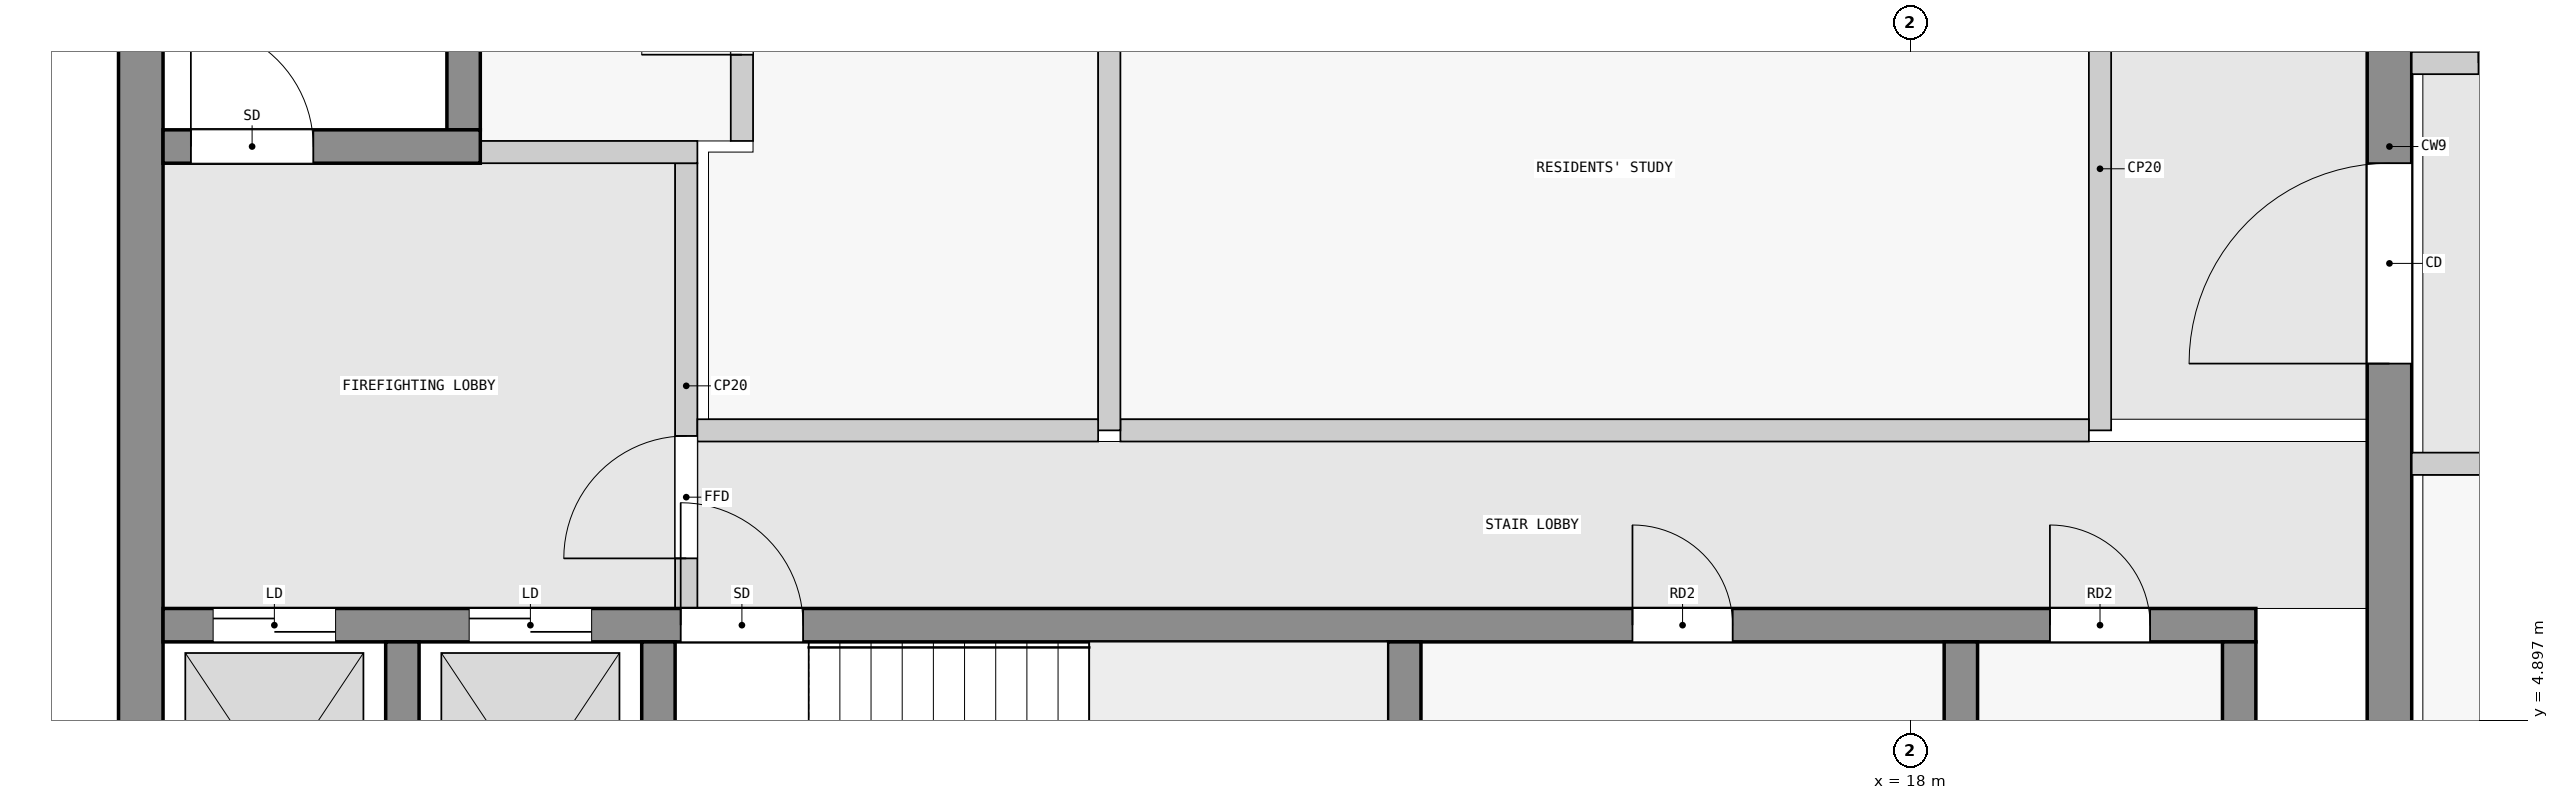
"""IFC4 building model, lengths in metres.
Left out: names, types, materials, properties, quantities, classifications, styles, units other than length and angle.
Written with IfcOpenShell. Run it as: python <this file> out.ifc"""

import sys

from ifc_helpers import new_model, si_unit, direction, frame, frame_2d, origin, place, context, subcontext, project, spatial, rectangle, extrude, element, fill, save


model = new_model("IFC4")
c1 = context("Model", 3, precision=1e-05, world=origin(), true_north=direction((0.0, 1.0)))
c2 = subcontext(c1, "Body", "Model", "MODEL_VIEW")
j1 = project(units=[si_unit("LENGTHUNIT", "METRE"), si_unit("PLANEANGLEUNIT", "RADIAN")], contexts=[c1])
p1 = place(None, origin())
s1 = spatial("IfcSite", under=j1, at=p1, CompositionType="ELEMENT")
p2 = place(p1, origin())
s2 = spatial("IfcBuilding", under=s1, at=p2, CompositionType="ELEMENT")
p3 = place(p2, frame((0.0, 0.0, 305.4)))
s3 = spatial("IfcBuildingStorey", under=s2, at=p3, CompositionType="ELEMENT", Elevation=305.4)
p4 = place(p3, frame((2.1, 2.5, 0.0), z_axis=(0.0, 0.0, 1.0), x_axis=(0.0, 1.0, 0.0)))
e1 = element("IfcWall", 1, at=p4, inside=s3, PredefinedType="SHEAR", context=c2, shape_type="SweptSolid", body=[
    extrude(rectangle(XDim=15.1, YDim=0.4, at=frame_2d((7.55, 0.0))), origin(), (0.0, 0.0, 1.0), 3.25),
])
p5 = place(p3, frame((22.3, 2.5, 0.0), z_axis=(0.0, 0.0, 1.0), x_axis=(0.0, 1.0, 0.0)))
e2 = element("IfcWall", 2, at=p5, inside=s3, PredefinedType="SHEAR", context=c2, shape_type="SweptSolid", body=[
    extrude(rectangle(XDim=15.1, YDim=0.4, at=frame_2d((7.55, 0.0))), origin(), (0.0, 0.0, 1.0), 3.25),
])
p6 = place(p5, frame((5.6, 0.0, 0.0)))
e3 = element("IfcOpeningElement", 3, at=p6, cuts=e2, PredefinedType="OPENING", context=c2, shape_type="SweptSolid", body=[
    extrude(rectangle(XDim=1.8, YDim=2.1, at=frame_2d((0.9, 1.05))), frame((0.0, 0.21, 0.0), z_axis=(0.0, -1.0, 0.0), x_axis=(1.0, 0.0, 0.0)), (0.0, 0.0, 1.0), 0.42),
])
for number, where, z_axis, x_axis in (
    (4, (4.45, 2.8, 0.0), (0.0, 0.0, 1.0), (0.0, 1.0, 0.0)),
    (5, (6.75, 2.8, 0.0), (0.0, 0.0, 1.0), (0.0, 1.0, 0.0)),
    (6, (13.45, 2.8, 0.0), (0.0, 0.0, 1.0), (0.0, 1.0, 0.0)),
    (7, (18.45, 2.8, 0.0), (0.0, 0.0, 1.0), (0.0, 1.0, 0.0)),
    (8, (20.95, 2.8, 0.0), (0.0, 0.0, 1.0), (0.0, 1.0, 0.0)),
):
    element("IfcWall", number, at=place(p3, frame(where, z_axis=z_axis, x_axis=x_axis)), inside=s3, PredefinedType="SHEAR", context=c2, shape_type="SweptSolid", body=[
        extrude(rectangle(XDim=2.8, YDim=0.3, at=frame_2d((1.4, 0.0))), origin(), (0.0, 0.0, 1.0), 3.25),
    ])
p7 = place(p3, frame((2.3, 5.75, 0.0), z_axis=(0.0, 0.0, 1.0), x_axis=(1.0, 0.0, 0.0)))
e9 = element("IfcWall", 9, at=p7, inside=s3, PredefinedType="SHEAR", context=c2, shape_type="SweptSolid", body=[
    extrude(rectangle(XDim=18.8, YDim=0.3, at=frame_2d((9.4, 0.0))), origin(), (0.0, 0.0, 1.0), 3.25),
])
p8 = place(p7, frame((4.65, 0.0, 0.0)))
e10 = element("IfcOpeningElement", 10, at=p8, cuts=e9, PredefinedType="OPENING", context=c2, shape_type="SweptSolid", body=[
    extrude(rectangle(XDim=1.1, YDim=2.1, at=frame_2d((0.55, 1.05))), frame((0.0, 0.16, 0.0), z_axis=(0.0, -1.0, 0.0), x_axis=(1.0, 0.0, 0.0)), (0.0, 0.0, 1.0), 0.32),
])
p9 = place(p7, frame((0.45, 0.0, 0.0)))
e11 = element("IfcOpeningElement", 11, at=p9, cuts=e9, PredefinedType="OPENING", context=c2, shape_type="SweptSolid", body=[
    extrude(rectangle(XDim=1.1, YDim=2.1, at=frame_2d((0.55, 1.05))), frame((0.0, 0.16, 0.0), z_axis=(0.0, -1.0, 0.0), x_axis=(1.0, 0.0, 0.0)), (0.0, 0.0, 1.0), 0.32),
])
p10 = place(p7, frame((2.75, 0.0, 0.0)))
e12 = element("IfcOpeningElement", 12, at=p10, cuts=e9, PredefinedType="OPENING", context=c2, shape_type="SweptSolid", body=[
    extrude(rectangle(XDim=1.1, YDim=2.1, at=frame_2d((0.55, 1.05))), frame((0.0, 0.16, 0.0), z_axis=(0.0, -1.0, 0.0), x_axis=(1.0, 0.0, 0.0)), (0.0, 0.0, 1.0), 0.32),
])
p11 = place(p7, frame((13.2, 0.0, 0.0)))
e13 = element("IfcOpeningElement", 13, at=p11, cuts=e9, PredefinedType="OPENING", context=c2, shape_type="SweptSolid", body=[
    extrude(rectangle(XDim=0.9, YDim=2.1, at=frame_2d((0.45, 1.05))), frame((0.0, 0.16, 0.0), z_axis=(0.0, -1.0, 0.0), x_axis=(1.0, 0.0, 0.0)), (0.0, 0.0, 1.0), 0.32),
])
p12 = place(p7, frame((16.95, 0.0, 0.0)))
e14 = element("IfcOpeningElement", 14, at=p12, cuts=e9, PredefinedType="OPENING", context=c2, shape_type="SweptSolid", body=[
    extrude(rectangle(XDim=0.9, YDim=2.1, at=frame_2d((0.45, 1.05))), frame((0.0, 0.16, 0.0), z_axis=(0.0, -1.0, 0.0), x_axis=(1.0, 0.0, 0.0)), (0.0, 0.0, 1.0), 0.32),
])
p13 = place(p3, frame((2.3, 10.05, 0.0), z_axis=(0.0, 0.0, 1.0), x_axis=(1.0, 0.0, 0.0)))
e15 = element("IfcWall", 15, at=p13, inside=s3, PredefinedType="SHEAR", context=c2, shape_type="SweptSolid", body=[
    extrude(rectangle(XDim=2.85, YDim=0.3, at=frame_2d((1.425, 0.0))), origin(), (0.0, 0.0, 1.0), 3.25),
])
p14 = place(p13, frame((0.25, 0.0, 0.0)))
e16 = element("IfcOpeningElement", 16, at=p14, cuts=e15, PredefinedType="OPENING", context=c2, shape_type="SweptSolid", body=[
    extrude(rectangle(XDim=1.1, YDim=2.1, at=frame_2d((0.55, 1.05))), frame((0.0, 0.16, 0.0), z_axis=(0.0, -1.0, 0.0), x_axis=(1.0, 0.0, 0.0)), (0.0, 0.0, 1.0), 0.32),
])
p15 = place(p3, frame((5.0, 10.2, 0.0), z_axis=(0.0, 0.0, 1.0), x_axis=(0.0, 1.0, 0.0)))
e17 = element("IfcWall", 17, at=p15, inside=s3, PredefinedType="SHEAR", context=c2, shape_type="SweptSolid", body=[
    extrude(rectangle(XDim=6.4, YDim=0.3, at=frame_2d((3.2, 0.0))), origin(), (0.0, 0.0, 1.0), 3.25),
])
p16 = place(p3, frame((7.0, 5.9, 0.0), z_axis=(0.0, 0.0, 1.0), x_axis=(0.0, 1.0, 0.0)))
e18 = element("IfcWall", 18, at=p16, inside=s3, PredefinedType="PARTITIONING", context=c2, shape_type="SweptSolid", body=[
    extrude(rectangle(XDim=4.0, YDim=0.2, at=frame_2d((2.0, 0.0))), origin(), (0.0, 0.0, 1.0), 3.25),
])
p17 = place(p16, frame((0.45, 0.0, 0.0)))
e19 = element("IfcOpeningElement", 19, at=p17, cuts=e18, PredefinedType="OPENING", context=c2, shape_type="SweptSolid", body=[
    extrude(rectangle(XDim=1.1, YDim=2.1, at=frame_2d((0.55, 1.05))), frame((0.0, 0.11, 0.0), z_axis=(0.0, -1.0, 0.0), x_axis=(1.0, 0.0, 0.0)), (0.0, 0.0, 1.0), 0.22),
])
p18 = place(p3, frame((5.15, 10.0, 0.0), z_axis=(0.0, 0.0, 1.0), x_axis=(1.0, 0.0, 0.0)))
e20 = element("IfcWall", 20, at=p18, inside=s3, PredefinedType="PARTITIONING", context=c2, shape_type="SweptSolid", body=[
    extrude(rectangle(XDim=1.95, YDim=0.2, at=frame_2d((0.975, 0.0))), origin(), (0.0, 0.0, 1.0), 3.25),
])
p19 = place(p3, frame((7.1, 7.5, 0.0), z_axis=(0.0, 0.0, 1.0), x_axis=(1.0, 0.0, 0.0)))
e21 = element("IfcWall", 21, at=p19, inside=s3, PredefinedType="PARTITIONING", context=c2, shape_type="SweptSolid", body=[
    extrude(rectangle(XDim=3.6, YDim=0.2, at=frame_2d((1.8, 0.0))), origin(), (0.0, 0.0, 1.0), 3.25),
])
p20 = place(p3, frame((10.8, 7.5, 0.0), z_axis=(0.0, 0.0, 1.0), x_axis=(0.0, 1.0, 0.0)))
e22 = element("IfcWall", 22, at=p20, inside=s3, PredefinedType="PARTITIONING", context=c2, shape_type="SweptSolid", body=[
    extrude(rectangle(XDim=4.7, YDim=0.2, at=frame_2d((2.35, 0.0))), origin(), (0.0, 0.0, 1.0), 3.25),
])
p21 = place(p3, frame((10.9, 7.5, 0.0), z_axis=(0.0, 0.0, 1.0), x_axis=(1.0, 0.0, 0.0)))
e23 = element("IfcWall", 23, at=p21, inside=s3, PredefinedType="PARTITIONING", context=c2, shape_type="SweptSolid", body=[
    extrude(rectangle(XDim=8.7, YDim=0.2, at=frame_2d((4.35, 0.0))), origin(), (0.0, 0.0, 1.0), 3.25),
])
p22 = place(p3, frame((19.7, 7.5, 0.0), z_axis=(0.0, 0.0, 1.0), x_axis=(0.0, 1.0, 0.0)))
e24 = element("IfcWall", 24, at=p22, inside=s3, PredefinedType="PARTITIONING", context=c2, shape_type="SweptSolid", body=[
    extrude(rectangle(XDim=4.7, YDim=0.2, at=frame_2d((2.35, 0.0))), origin(), (0.0, 0.0, 1.0), 3.25),
])
p23 = place(p3, frame((7.5, 10.1, 0.0), z_axis=(0.0, 0.0, 1.0), x_axis=(0.0, 1.0, 0.0)))
e25 = element("IfcWall", 25, at=p23, inside=s3, PredefinedType="PARTITIONING", context=c2, shape_type="SweptSolid", body=[
    extrude(rectangle(XDim=7.5, YDim=0.2, at=frame_2d((3.75, 0.0))), origin(), (0.0, 0.0, 1.0), 3.25),
])
p24 = place(p23, frame((0.775, 0.0, 0.0)))
e26 = element("IfcOpeningElement", 26, at=p24, cuts=e25, PredefinedType="OPENING", context=c2, shape_type="SweptSolid", body=[
    extrude(rectangle(XDim=0.9, YDim=2.1, at=frame_2d((0.45, 1.05))), frame((0.0, 0.11, 0.0), z_axis=(0.0, -1.0, 0.0), x_axis=(1.0, 0.0, 0.0)), (0.0, 0.0, 1.0), 0.22),
])
p25 = place(p23, frame((3.225, 0.0, 0.0)))
e27 = element("IfcOpeningElement", 27, at=p25, cuts=e25, PredefinedType="OPENING", context=c2, shape_type="SweptSolid", body=[
    extrude(rectangle(XDim=0.9, YDim=2.1, at=frame_2d((0.45, 1.05))), frame((0.0, 0.11, 0.0), z_axis=(0.0, -1.0, 0.0), x_axis=(1.0, 0.0, 0.0)), (0.0, 0.0, 1.0), 0.22),
])
p26 = place(p23, frame((5.25, 0.0, 0.0)))
e28 = element("IfcOpeningElement", 28, at=p26, cuts=e25, PredefinedType="OPENING", context=c2, shape_type="SweptSolid", body=[
    extrude(rectangle(XDim=0.9, YDim=2.1, at=frame_2d((0.45, 1.05))), frame((0.0, 0.11, 0.0), z_axis=(0.0, -1.0, 0.0), x_axis=(1.0, 0.0, 0.0)), (0.0, 0.0, 1.0), 0.22),
])
p27 = place(p3, frame((27.0, 7.2, 0.0), z_axis=(0.0, 0.0, 1.0), x_axis=(-1.0, 0.0, 0.0)))
e29 = element("IfcWall", 29, at=p27, inside=s3, PredefinedType="PARTITIONING", context=c2, shape_type="SweptSolid", body=[
    extrude(rectangle(XDim=4.5, YDim=0.2, at=frame_2d((2.25, 0.0))), origin(), (0.0, 0.0, 1.0), 2.642),
])
p28 = place(p27, frame((1.35, 0.0, 0.0)))
e30 = element("IfcOpeningElement", 30, at=p28, cuts=e29, PredefinedType="OPENING", context=c2, shape_type="SweptSolid", body=[
    extrude(rectangle(XDim=1.8, YDim=2.1, at=frame_2d((0.9, 1.05))), frame((0.0, 0.11, 0.0), z_axis=(0.0, -1.0, 0.0), x_axis=(1.0, 0.0, 0.0)), (0.0, 0.0, 1.0), 0.22),
])
p29 = place(p3, frame((22.5, 10.8, 0.0), z_axis=(0.0, 0.0, 1.0), x_axis=(1.0, 0.0, 0.0)))
e31 = element("IfcWall", 31, at=p29, inside=s3, PredefinedType="PARTITIONING", context=c2, shape_type="SweptSolid", body=[
    extrude(rectangle(XDim=2.25, YDim=0.2, at=frame_2d((1.125, 0.0))), origin(), (0.0, 0.0, 1.0), 3.25),
])
p30 = place(p29, frame((0.6, 0.0, 0.0)))
e32 = element("IfcOpeningElement", 32, at=p30, cuts=e31, PredefinedType="OPENING", context=c2, shape_type="SweptSolid", body=[
    extrude(rectangle(XDim=0.9, YDim=2.1, at=frame_2d((0.45, 1.05))), frame((0.0, 0.11, 0.0), z_axis=(0.0, -1.0, 0.0), x_axis=(1.0, 0.0, 0.0)), (0.0, 0.0, 1.0), 0.22),
])
p31 = place(p17, origin())
e33 = element("IfcDoor", 33, at=p31, inside=s3, OperationType="SINGLE_SWING_LEFT", PredefinedType="DOOR", context=c2, shape_type="SweptSolid", body=[
    extrude(rectangle(XDim=1.1, YDim=2.1, at=frame_2d((0.55, 1.05))), frame((0.0, 0.025, 0.0), z_axis=(0.0, -1.0, 0.0), x_axis=(1.0, 0.0, 0.0)), (0.0, 0.0, 1.0), 0.05),
])
fill(e19, e33)
p32 = place(p14, origin())
e34 = element("IfcDoor", 34, at=p32, inside=s3, OperationType="SINGLE_SWING_RIGHT", PredefinedType="DOOR", context=c2, shape_type="SweptSolid", body=[
    extrude(rectangle(XDim=1.1, YDim=2.1, at=frame_2d((0.55, 1.05))), frame((0.0, 0.025, 0.0), z_axis=(0.0, -1.0, 0.0), x_axis=(1.0, 0.0, 0.0)), (0.0, 0.0, 1.0), 0.05),
])
fill(e16, e34)
p33 = place(p8, origin())
e35 = element("IfcDoor", 35, at=p33, inside=s3, OperationType="SINGLE_SWING_LEFT", PredefinedType="DOOR", context=c2, shape_type="SweptSolid", body=[
    extrude(rectangle(XDim=1.1, YDim=2.1, at=frame_2d((0.55, 1.05))), frame((0.0, 0.025, 0.0), z_axis=(0.0, -1.0, 0.0), x_axis=(1.0, 0.0, 0.0)), (0.0, 0.0, 1.0), 0.05),
])
fill(e10, e35)
p34 = place(p9, origin())
e36 = element("IfcDoor", 36, at=p34, inside=s3, OperationType="DOUBLE_DOOR_SLIDING", PredefinedType="DOOR", context=c2, shape_type="SweptSolid", body=[
    extrude(rectangle(XDim=1.1, YDim=2.1, at=frame_2d((0.55, 1.05))), frame((0.0, 0.025, 0.0), z_axis=(0.0, -1.0, 0.0), x_axis=(1.0, 0.0, 0.0)), (0.0, 0.0, 1.0), 0.05),
])
fill(e11, e36)
p35 = place(p10, origin())
e37 = element("IfcDoor", 37, at=p35, inside=s3, OperationType="DOUBLE_DOOR_SLIDING", PredefinedType="DOOR", context=c2, shape_type="SweptSolid", body=[
    extrude(rectangle(XDim=1.1, YDim=2.1, at=frame_2d((0.55, 1.05))), frame((0.0, 0.025, 0.0), z_axis=(0.0, -1.0, 0.0), x_axis=(1.0, 0.0, 0.0)), (0.0, 0.0, 1.0), 0.05),
])
fill(e12, e37)
p36 = place(p6, origin())
e38 = element("IfcDoor", 38, at=p36, inside=s3, OperationType="DOUBLE_DOOR_SINGLE_SWING", PredefinedType="DOOR", context=c2, shape_type="SweptSolid", body=[
    extrude(rectangle(XDim=1.8, YDim=2.1, at=frame_2d((0.9, 1.05))), frame((0.0, 0.025, 0.0), z_axis=(0.0, -1.0, 0.0), x_axis=(1.0, 0.0, 0.0)), (0.0, 0.0, 1.0), 0.05),
])
fill(e3, e38)
p37 = place(p24, origin())
e39 = element("IfcDoor", 39, at=p37, inside=s3, OperationType="SINGLE_SWING_RIGHT", PredefinedType="DOOR", context=c2, shape_type="SweptSolid", body=[
    extrude(rectangle(XDim=0.9, YDim=2.1, at=frame_2d((0.45, 1.05))), frame((0.0, 0.025, 0.0), z_axis=(0.0, -1.0, 0.0), x_axis=(1.0, 0.0, 0.0)), (0.0, 0.0, 1.0), 0.05),
])
fill(e26, e39)
p38 = place(p11, origin())
e40 = element("IfcDoor", 40, at=p38, inside=s3, OperationType="SINGLE_SWING_LEFT", PredefinedType="DOOR", context=c2, shape_type="SweptSolid", body=[
    extrude(rectangle(XDim=0.9, YDim=2.1, at=frame_2d((0.45, 1.05))), frame((0.0, 0.025, 0.0), z_axis=(0.0, -1.0, 0.0), x_axis=(1.0, 0.0, 0.0)), (0.0, 0.0, 1.0), 0.05),
])
fill(e13, e40)
p39 = place(p12, origin())
e41 = element("IfcDoor", 41, at=p39, inside=s3, OperationType="SINGLE_SWING_LEFT", PredefinedType="DOOR", context=c2, shape_type="SweptSolid", body=[
    extrude(rectangle(XDim=0.9, YDim=2.1, at=frame_2d((0.45, 1.05))), frame((0.0, 0.025, 0.0), z_axis=(0.0, -1.0, 0.0), x_axis=(1.0, 0.0, 0.0)), (0.0, 0.0, 1.0), 0.05),
])
fill(e14, e41)
save(model, sys.argv[1])
